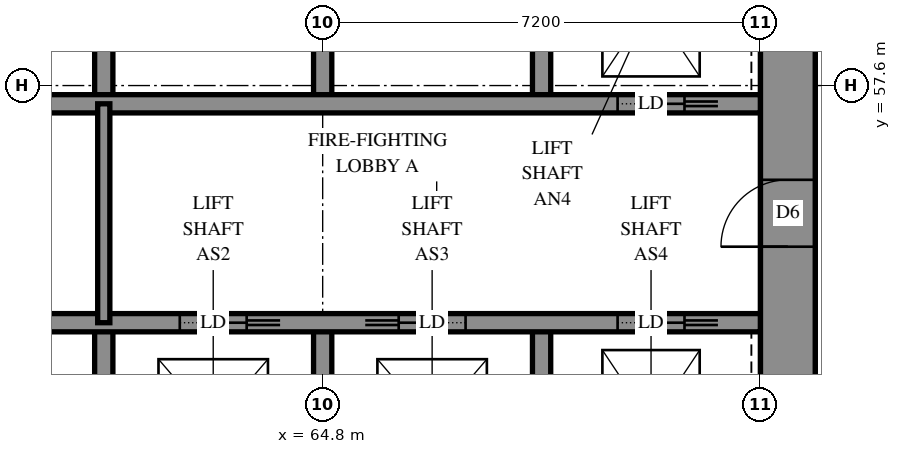
"""IFC4 building model, lengths in metres.
Left out: names, types, materials, properties, quantities, classifications, styles, units other than length and angle.
Written with IfcOpenShell. Run it as: python <this file> out.ifc"""

import sys

from ifc_helpers import new_model, si_unit, direction, frame, frame_2d, origin, place, context, subcontext, project, spatial, rectangle, extrude, element, fill, save


model = new_model("IFC4")
c1 = context("Model", 3, precision=1e-05, world=origin(), true_north=direction((0.0, 1.0)))
c2 = subcontext(c1, "Body", "Model", "MODEL_VIEW")
j1 = project(units=[si_unit("LENGTHUNIT", "METRE"), si_unit("PLANEANGLEUNIT", "RADIAN")], contexts=[c1])
p1 = place(None, origin())
s1 = spatial("IfcSite", under=j1, at=p1, CompositionType="ELEMENT")
p2 = place(p1, origin())
s2 = spatial("IfcBuilding", under=s1, at=p2, CompositionType="ELEMENT")
p3 = place(p2, frame((0.0, 0.0, 77.0)))
s3 = spatial("IfcBuildingStorey", under=s2, at=p3, CompositionType="ELEMENT", Elevation=77.0)
p4 = place(p3, frame((72.45, 50.4, -0.3), z_axis=(0.0, 0.0, 1.0), x_axis=(0.0, 1.0, 0.0)))
e1 = element("IfcWall", 1, at=p4, inside=s3, PredefinedType="SHEAR", context=c2, shape_type="SweptSolid", body=[
    extrude(rectangle(XDim=14.4, YDim=0.9, at=frame_2d((7.2, 0.0))), origin(), (0.0, 0.0, 1.0), 3.5),
])
p5 = place(p4, frame((4.55, 0.0, 0.3)))
e2 = element("IfcOpeningElement", 2, at=p5, cuts=e1, PredefinedType="OPENING", context=c2, shape_type="SweptSolid", body=[
    extrude(rectangle(XDim=1.1, YDim=2.1, at=frame_2d((0.55, 1.05))), frame((0.0, 0.46, 0.0), z_axis=(0.0, -1.0, 0.0), x_axis=(1.0, 0.0, 0.0)), (0.0, 0.0, 1.0), 0.92),
])
p6 = place(p4, frame((11.35, 0.0, 0.3)))
e3 = element("IfcOpeningElement", 3, at=p6, cuts=e1, PredefinedType="OPENING", context=c2, shape_type="SweptSolid", body=[
    extrude(rectangle(XDim=1.1, YDim=2.1, at=frame_2d((0.55, 1.05))), frame((0.0, 0.46, 0.0), z_axis=(0.0, -1.0, 0.0), x_axis=(1.0, 0.0, 0.0)), (0.0, 0.0, 1.0), 0.92),
])
for number, where, z_axis, x_axis in (
    (4, (61.2, 50.4, 0.0), (0.0, 0.0, 1.0), (0.0, 1.0, 0.0)),
    (5, (61.2, 57.3, 0.0), (0.0, 0.0, 1.0), (0.0, 1.0, 0.0)),
    (6, (64.8, 50.4, 0.0), (0.0, 0.0, 1.0), (0.0, 1.0, 0.0)),
    (7, (64.8, 57.3, 0.0), (0.0, 0.0, 1.0), (0.0, 1.0, 0.0)),
    (8, (68.4, 50.4, 0.0), (0.0, 0.0, 1.0), (0.0, 1.0, 0.0)),
    (9, (68.4, 57.3, 0.0), (0.0, 0.0, 1.0), (0.0, 1.0, 0.0)),
):
    element("IfcWall", number, at=place(p3, frame(where, z_axis=z_axis, x_axis=x_axis)), inside=s3, PredefinedType="SOLIDWALL", context=c2, shape_type="SweptSolid", body=[
        extrude(rectangle(XDim=3.3, YDim=0.3, at=frame_2d((1.65, 0.0))), origin(), (0.0, 0.0, 1.0), 3.9),
    ])
p7 = place(p3, frame((57.6, 53.7, 0.0), z_axis=(0.0, 0.0, 1.0), x_axis=(1.0, 0.0, 0.0)))
e10 = element("IfcWall", 10, at=p7, inside=s3, PredefinedType="SOLIDWALL", context=c2, shape_type="SweptSolid", body=[
    extrude(rectangle(XDim=14.4, YDim=0.3, at=frame_2d((7.2, 0.0))), origin(), (0.0, 0.0, 1.0), 3.9),
])
p8 = place(p7, frame((1.25, 0.0, 0.0)))
e11 = element("IfcOpeningElement", 11, at=p8, cuts=e10, PredefinedType="OPENING", context=c2, shape_type="SweptSolid", body=[
    extrude(rectangle(XDim=1.1, YDim=2.1, at=frame_2d((0.55, 1.05))), frame((0.0, 0.16, 0.0), z_axis=(0.0, -1.0, 0.0), x_axis=(1.0, 0.0, 0.0)), (0.0, 0.0, 1.0), 0.32),
])
p9 = place(p7, frame((4.85, 0.0, 0.0)))
e12 = element("IfcOpeningElement", 12, at=p9, cuts=e10, PredefinedType="OPENING", context=c2, shape_type="SweptSolid", body=[
    extrude(rectangle(XDim=1.1, YDim=2.1, at=frame_2d((0.55, 1.05))), frame((0.0, 0.16, 0.0), z_axis=(0.0, -1.0, 0.0), x_axis=(1.0, 0.0, 0.0)), (0.0, 0.0, 1.0), 0.32),
])
p10 = place(p7, frame((8.45, 0.0, 0.0)))
e13 = element("IfcOpeningElement", 13, at=p10, cuts=e10, PredefinedType="OPENING", context=c2, shape_type="SweptSolid", body=[
    extrude(rectangle(XDim=1.1, YDim=2.1, at=frame_2d((0.55, 1.05))), frame((0.0, 0.16, 0.0), z_axis=(0.0, -1.0, 0.0), x_axis=(1.0, 0.0, 0.0)), (0.0, 0.0, 1.0), 0.32),
])
p11 = place(p7, frame((12.05, 0.0, 0.0)))
e14 = element("IfcOpeningElement", 14, at=p11, cuts=e10, PredefinedType="OPENING", context=c2, shape_type="SweptSolid", body=[
    extrude(rectangle(XDim=1.1, YDim=2.1, at=frame_2d((0.55, 1.05))), frame((0.0, 0.16, 0.0), z_axis=(0.0, -1.0, 0.0), x_axis=(1.0, 0.0, 0.0)), (0.0, 0.0, 1.0), 0.32),
])
p12 = place(p3, frame((57.6, 57.3, 0.0), z_axis=(0.0, 0.0, 1.0), x_axis=(1.0, 0.0, 0.0)))
e15 = element("IfcWall", 15, at=p12, inside=s3, PredefinedType="SOLIDWALL", context=c2, shape_type="SweptSolid", body=[
    extrude(rectangle(XDim=14.4, YDim=0.3, at=frame_2d((7.2, 0.0))), origin(), (0.0, 0.0, 1.0), 3.9),
])
p13 = place(p12, frame((12.05, 0.0, 0.0)))
e16 = element("IfcOpeningElement", 16, at=p13, cuts=e15, PredefinedType="OPENING", context=c2, shape_type="SweptSolid", body=[
    extrude(rectangle(XDim=1.1, YDim=2.1, at=frame_2d((0.55, 1.05))), frame((0.0, 0.16, 0.0), z_axis=(0.0, -1.0, 0.0), x_axis=(1.0, 0.0, 0.0)), (0.0, 0.0, 1.0), 0.32),
])
p14 = place(p3, frame((61.2, 53.7, 0.0), z_axis=(0.0, 0.0, 1.0), x_axis=(0.0, 1.0, 0.0)))
e17 = element("IfcWall", 17, at=p14, inside=s3, PredefinedType="PARTITIONING", context=c2, shape_type="SweptSolid", body=[
    extrude(rectangle(XDim=3.6, YDim=0.2, at=frame_2d((1.8, 0.0))), origin(), (0.0, 0.0, 1.0), 3.9),
])
p15 = place(p5, origin())
e18 = element("IfcDoor", 18, at=p15, inside=s3, OperationType="DOUBLE_DOOR_SINGLE_SWING", PredefinedType="DOOR", context=c2, shape_type="SweptSolid", body=[
    extrude(rectangle(XDim=1.1, YDim=2.1, at=frame_2d((0.55, 1.05))), frame((0.0, 0.025, 0.0), z_axis=(0.0, -1.0, 0.0), x_axis=(1.0, 0.0, 0.0)), (0.0, 0.0, 1.0), 0.05),
])
fill(e2, e18)
p16 = place(p9, origin())
e19 = element("IfcDoor", 19, at=p16, inside=s3, OperationType="SLIDING_TO_RIGHT", PredefinedType="DOOR", context=c2, shape_type="SweptSolid", body=[
    extrude(rectangle(XDim=1.1, YDim=2.1, at=frame_2d((0.55, 1.05))), frame((0.0, 0.025, 0.0), z_axis=(0.0, -1.0, 0.0), x_axis=(1.0, 0.0, 0.0)), (0.0, 0.0, 1.0), 0.05),
])
fill(e12, e19)
p17 = place(p10, origin())
e20 = element("IfcDoor", 20, at=p17, inside=s3, OperationType="SLIDING_TO_LEFT", PredefinedType="DOOR", context=c2, shape_type="SweptSolid", body=[
    extrude(rectangle(XDim=1.1, YDim=2.1, at=frame_2d((0.55, 1.05))), frame((0.0, 0.025, 0.0), z_axis=(0.0, -1.0, 0.0), x_axis=(1.0, 0.0, 0.0)), (0.0, 0.0, 1.0), 0.05),
])
fill(e13, e20)
p18 = place(p11, origin())
e21 = element("IfcDoor", 21, at=p18, inside=s3, OperationType="SLIDING_TO_RIGHT", PredefinedType="DOOR", context=c2, shape_type="SweptSolid", body=[
    extrude(rectangle(XDim=1.1, YDim=2.1, at=frame_2d((0.55, 1.05))), frame((0.0, 0.025, 0.0), z_axis=(0.0, -1.0, 0.0), x_axis=(1.0, 0.0, 0.0)), (0.0, 0.0, 1.0), 0.05),
])
fill(e14, e21)
p19 = place(p13, origin())
e22 = element("IfcDoor", 22, at=p19, inside=s3, OperationType="SLIDING_TO_RIGHT", PredefinedType="DOOR", context=c2, shape_type="SweptSolid", body=[
    extrude(rectangle(XDim=1.1, YDim=2.1, at=frame_2d((0.55, 1.05))), frame((0.0, 0.025, 0.0), z_axis=(0.0, -1.0, 0.0), x_axis=(1.0, 0.0, 0.0)), (0.0, 0.0, 1.0), 0.05),
])
fill(e16, e22)
save(model, sys.argv[1])
